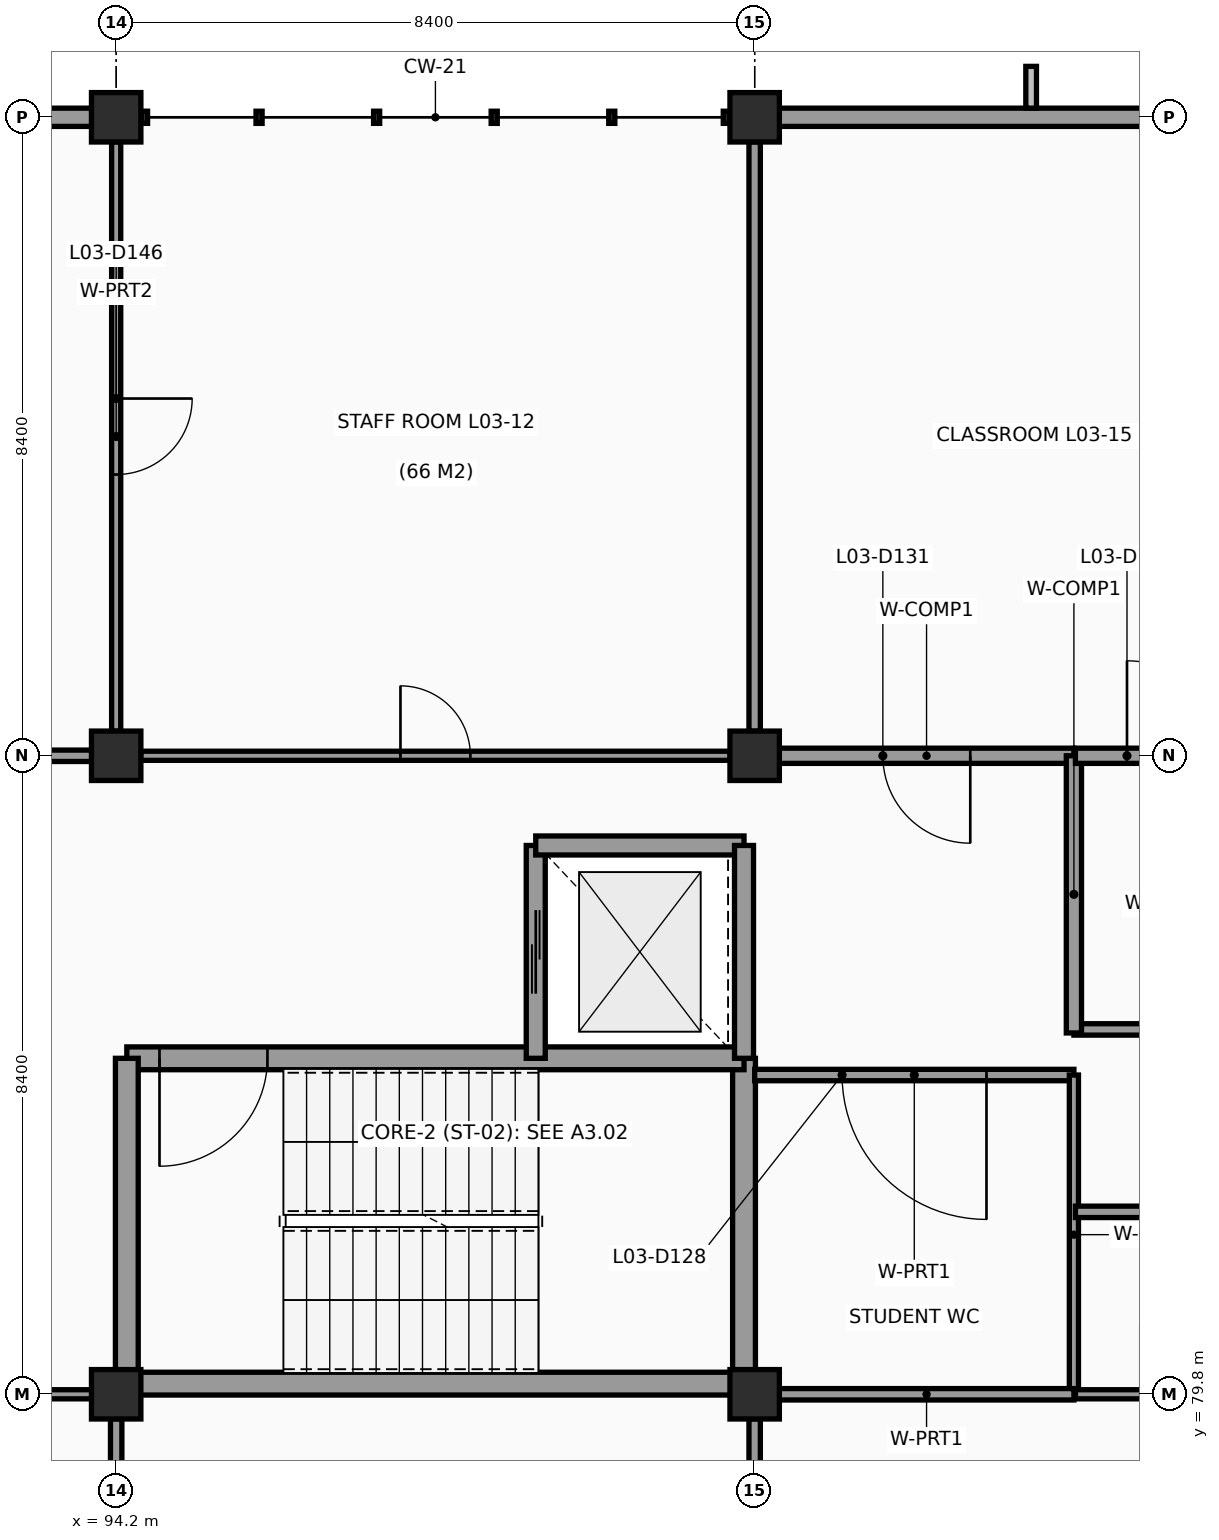
"""IFC4 building model, lengths in metres.
Left out: names, types, materials, properties, quantities, classifications, styles, units other than length and angle.
Written with IfcOpenShell. Run it as: python <this file> out.ifc"""

import sys

from ifc_helpers import new_model, si_unit, direction, frame, frame_2d, origin, origin_2d, place, context, subcontext, project, spatial, rectangle, extrude, element, fill, save


model = new_model("IFC4")
c1 = context("Model", 3, precision=1e-05, world=origin(), true_north=direction((0.0, 1.0)))
c2 = subcontext(c1, "Body", "Model", "MODEL_VIEW")
j1 = project(units=[si_unit("LENGTHUNIT", "METRE"), si_unit("PLANEANGLEUNIT", "RADIAN")], contexts=[c1])
p1 = place(None, origin())
s1 = spatial("IfcSite", under=j1, at=p1, CompositionType="ELEMENT")
p2 = place(p1, origin())
s2 = spatial("IfcBuilding", under=s1, at=p2, CompositionType="ELEMENT")
p3 = place(p2, frame((0.0, 0.0, 11.4)))
s3 = spatial("IfcBuildingStorey", under=s2, at=p3, CompositionType="ELEMENT", Elevation=11.4)
for number, where, z_axis, x_axis in (
    (1, (94.2, 79.8, 0.0), (0.0, 0.0, 1.0), (1.0, 0.0, 0.0)),
    (2, (94.2, 88.2, 0.0), (0.0, 0.0, 1.0), (1.0, 0.0, 0.0)),
    (3, (94.2, 96.6, 0.0), (0.0, 0.0, 1.0), (1.0, 0.0, 0.0)),
    (4, (102.6, 79.8, 0.0), (0.0, 0.0, 1.0), (1.0, 0.0, 0.0)),
    (5, (102.6, 88.2, 0.0), (0.0, 0.0, 1.0), (1.0, 0.0, 0.0)),
    (6, (102.6, 96.6, 0.0), (0.0, 0.0, 1.0), (1.0, 0.0, 0.0)),
):
    element("IfcColumn", number, at=place(p3, frame(where, z_axis=z_axis, x_axis=x_axis)), inside=s3, PredefinedType="COLUMN", context=c2, shape_type="SweptSolid", body=[
        extrude(rectangle(XDim=0.65, YDim=0.65, at=origin_2d()), origin(), (0.0, 0.0, 1.0), 3.6),
    ])
p4 = place(p3, frame((86.123, 96.6, 0.0), z_axis=(0.0, 0.0, 1.0), x_axis=(1.0, 0.0, 0.0)))
e7 = element("IfcWall", 7, at=p4, inside=s3, PredefinedType="SOLIDWALL", context=c2, shape_type="SweptSolid", body=[
    extrude(rectangle(XDim=7.754, YDim=0.24, at=frame_2d((3.877, 0.0))), origin(), (0.0, 0.0, 1.0), 2.64),
])
p5 = place(p3, frame((102.923, 96.6, 0.0), z_axis=(0.0, 0.0, 1.0), x_axis=(1.0, 0.0, 0.0)))
e8 = element("IfcWall", 8, at=p5, inside=s3, PredefinedType="SOLIDWALL", context=c2, shape_type="SweptSolid", body=[
    extrude(rectangle(XDim=6.629, YDim=0.24, at=frame_2d((3.314, 0.0))), origin(), (0.0, 0.0, 1.0), 2.64),
])
p6 = place(p3, frame((94.34, 79.94, 0.0), z_axis=(0.0, 0.0, 1.0), x_axis=(1.0, 0.0, 0.0)))
e9 = element("IfcWall", 9, at=p6, inside=s3, PredefinedType="SHEAR", context=c2, shape_type="SweptSolid", body=[
    extrude(rectangle(XDim=8.12, YDim=0.3, at=frame_2d((4.06, 0.0))), origin(), (0.0, 0.0, 1.0), 3.6),
])
p7 = place(p3, frame((102.46, 79.94, 0.0), z_axis=(0.0, 0.0, 1.0), x_axis=(0.0, 1.0, 0.0)))
e10 = element("IfcWall", 10, at=p7, inside=s3, PredefinedType="SHEAR", context=c2, shape_type="SweptSolid", body=[
    extrude(rectangle(XDim=4.28, YDim=0.3, at=frame_2d((2.14, 0.0))), origin(), (0.0, 0.0, 1.0), 3.6),
])
p8 = place(p3, frame((102.46, 84.22, 0.0), z_axis=(0.0, 0.0, 1.0), x_axis=(-1.0, 0.0, 0.0)))
e11 = element("IfcWall", 11, at=p8, inside=s3, PredefinedType="SHEAR", context=c2, shape_type="SweptSolid", body=[
    extrude(rectangle(XDim=8.12, YDim=0.3, at=frame_2d((4.06, 0.0))), origin(), (0.0, 0.0, 1.0), 3.6),
])
p9 = place(p8, frame((6.27, 0.0, 0.0)))
e12 = element("IfcOpeningElement", 12, at=p9, cuts=e11, PredefinedType="OPENING", context=c2, shape_type="SweptSolid", body=[
    extrude(rectangle(XDim=1.42, YDim=2.15, at=frame_2d((0.71, 1.075))), frame((0.0, 0.16, 0.0), z_axis=(0.0, -1.0, 0.0), x_axis=(1.0, 0.0, 0.0)), (0.0, 0.0, 1.0), 0.32),
])
p10 = place(p3, frame((94.34, 84.22, 0.0), z_axis=(0.0, 0.0, 1.0), x_axis=(0.0, -1.0, 0.0)))
e13 = element("IfcWall", 13, at=p10, inside=s3, PredefinedType="SHEAR", context=c2, shape_type="SweptSolid", body=[
    extrude(rectangle(XDim=4.28, YDim=0.3, at=frame_2d((2.14, 0.0))), origin(), (0.0, 0.0, 1.0), 3.6),
])
p11 = place(p3, frame((99.72, 87.02, 0.0), z_axis=(0.0, 0.0, 1.0), x_axis=(0.0, -1.0, 0.0)))
e14 = element("IfcWall", 14, at=p11, inside=s3, PredefinedType="SHEAR", context=c2, shape_type="SweptSolid", body=[
    extrude(rectangle(XDim=2.8, YDim=0.25, at=frame_2d((1.4, 0.0))), origin(), (0.0, 0.0, 1.0), 3.6),
])
p12 = place(p11, frame((0.85, 0.0, 0.0)))
e15 = element("IfcOpeningElement", 15, at=p12, cuts=e14, PredefinedType="OPENING", context=c2, shape_type="SweptSolid", body=[
    extrude(rectangle(XDim=1.1, YDim=2.15, at=frame_2d((0.55, 1.075))), frame((0.0, 0.135, 0.0), z_axis=(0.0, -1.0, 0.0), x_axis=(1.0, 0.0, 0.0)), (0.0, 0.0, 1.0), 0.27),
])
p13 = place(p3, frame((102.46, 87.02, 0.0), z_axis=(0.0, 0.0, 1.0), x_axis=(-1.0, 0.0, 0.0)))
e16 = element("IfcWall", 16, at=p13, inside=s3, PredefinedType="SHEAR", context=c2, shape_type="SweptSolid", body=[
    extrude(rectangle(XDim=2.74, YDim=0.25, at=frame_2d((1.37, 0.0))), origin(), (0.0, 0.0, 1.0), 3.6),
])
p14 = place(p3, frame((102.46, 84.22, 0.0), z_axis=(0.0, 0.0, 1.0), x_axis=(0.0, 1.0, 0.0)))
e17 = element("IfcWall", 17, at=p14, inside=s3, PredefinedType="SHEAR", context=c2, shape_type="SweptSolid", body=[
    extrude(rectangle(XDim=2.8, YDim=0.25, at=frame_2d((1.4, 0.0))), origin(), (0.0, 0.0, 1.0), 3.6),
])
p15 = place(p3, frame((102.6, 84.0, 0.0), z_axis=(0.0, 0.0, 1.0), x_axis=(1.0, 0.0, 0.0)))
e18 = element("IfcWall", 18, at=p15, inside=s3, PredefinedType="PARTITIONING", context=c2, shape_type="SweptSolid", body=[
    extrude(rectangle(XDim=4.2, YDim=0.15, at=frame_2d((2.1, 0.0))), origin(), (0.0, 0.0, 1.0), 2.94),
])
p16 = place(p15, frame((1.15, 0.0, 0.0)))
e19 = element("IfcOpeningElement", 19, at=p16, cuts=e18, PredefinedType="OPENING", context=c2, shape_type="SweptSolid", body=[
    extrude(rectangle(XDim=1.9, YDim=2.3, at=frame_2d((0.95, 1.15))), frame((0.0, 0.085, 0.0), z_axis=(0.0, -1.0, 0.0), x_axis=(1.0, 0.0, 0.0)), (0.0, 0.0, 1.0), 0.17),
])
p17 = place(p3, frame((106.8, 84.0, 0.0), z_axis=(0.0, 0.0, 1.0), x_axis=(0.0, -1.0, 0.0)))
e20 = element("IfcWall", 20, at=p17, inside=s3, PredefinedType="PARTITIONING", context=c2, shape_type="SweptSolid", body=[
    extrude(rectangle(XDim=4.2, YDim=0.12, at=frame_2d((2.1, 0.0))), origin(), (0.0, 0.0, 1.0), 2.59),
])
p18 = place(p3, frame((106.8, 79.8, 0.0), z_axis=(0.0, 0.0, 1.0), x_axis=(-1.0, 0.0, 0.0)))
e21 = element("IfcWall", 21, at=p18, inside=s3, PredefinedType="PARTITIONING", context=c2, shape_type="SweptSolid", body=[
    extrude(rectangle(XDim=3.877, YDim=0.15, at=frame_2d((1.938, 0.0))), origin(), (0.0, 0.0, 1.0), 2.59),
])
p19 = place(p3, frame((110.727, 79.8, 0.0), z_axis=(0.0, 0.0, 1.0), x_axis=(-1.0, 0.0, 0.0)))
e22 = element("IfcWall", 22, at=p19, inside=s3, PredefinedType="PARTITIONING", context=c2, shape_type="SweptSolid", body=[
    extrude(rectangle(XDim=3.907, YDim=0.12, at=frame_2d((1.954, 0.0))), origin(), (0.0, 0.0, 1.0), 2.59),
])
p20 = place(p19, frame((2.154, 0.0, 0.0)))
e23 = element("IfcOpeningElement", 23, at=p20, cuts=e22, PredefinedType="OPENING", context=c2, shape_type="SweptSolid", body=[
    extrude(rectangle(XDim=0.9, YDim=2.1, at=frame_2d((0.45, 1.05))), frame((0.0, 0.07, 0.0), z_axis=(0.0, -1.0, 0.0), x_axis=(1.0, 0.0, 0.0)), (0.0, 0.0, 1.0), 0.14),
])
p21 = place(p3, frame((106.82, 82.2, 0.0), z_axis=(0.0, 0.0, 1.0), x_axis=(1.0, 0.0, 0.0)))
e24 = element("IfcWall", 24, at=p21, inside=s3, PredefinedType="PARTITIONING", context=c2, shape_type="SweptSolid", body=[
    extrude(rectangle(XDim=4.18, YDim=0.15, at=frame_2d((2.09, 0.0))), origin(), (0.0, 0.0, 1.0), 2.98),
])
p22 = place(p3, frame((106.8, 84.6, 0.0), z_axis=(0.0, 0.0, 1.0), x_axis=(1.0, 0.0, 0.0)))
e25 = element("IfcWall", 25, at=p22, inside=s3, PredefinedType="PARTITIONING", context=c2, shape_type="SweptSolid", body=[
    extrude(rectangle(XDim=4.2, YDim=0.15, at=frame_2d((2.1, 0.0))), origin(), (0.0, 0.0, 1.0), 2.98),
])
p23 = place(p22, frame((1.65, 0.0, 0.0)))
e26 = element("IfcOpeningElement", 26, at=p23, cuts=e25, PredefinedType="OPENING", context=c2, shape_type="SweptSolid", body=[
    extrude(rectangle(XDim=0.9, YDim=2.05, at=frame_2d((0.45, 1.025))), frame((0.0, 0.085, 0.0), z_axis=(0.0, -1.0, 0.0), x_axis=(1.0, 0.0, 0.0)), (0.0, 0.0, 1.0), 0.17),
])
p24 = place(p3, frame((102.923, 88.2, 0.0), z_axis=(0.0, 0.0, 1.0), x_axis=(1.0, 0.0, 0.0)))
e27 = element("IfcWall", 27, at=p24, inside=s3, PredefinedType="PARTITIONING", context=c2, shape_type="SweptSolid", body=[
    extrude(rectangle(XDim=3.877, YDim=0.2, at=frame_2d((1.938, 0.0))), origin(), (0.0, 0.0, 1.0), 2.69),
])
p25 = place(p24, frame((1.364, 0.0, 0.0)))
e28 = element("IfcOpeningElement", 28, at=p25, cuts=e27, PredefinedType="OPENING", context=c2, shape_type="SweptSolid", body=[
    extrude(rectangle(XDim=1.15, YDim=2.15, at=frame_2d((0.575, 1.075))), frame((0.0, 0.11, 0.0), z_axis=(0.0, -1.0, 0.0), x_axis=(1.0, 0.0, 0.0)), (0.0, 0.0, 1.0), 0.22),
])
p26 = place(p3, frame((106.8, 88.2, 0.0), z_axis=(0.0, 0.0, 1.0), x_axis=(0.0, -1.0, 0.0)))
e29 = element("IfcWall", 29, at=p26, inside=s3, PredefinedType="PARTITIONING", context=c2, shape_type="SweptSolid", body=[
    extrude(rectangle(XDim=3.646, YDim=0.2, at=frame_2d((1.823, 0.0))), origin(), (0.0, 0.0, 1.0), 2.69),
])
p27 = place(p3, frame((106.82, 88.2, 0.0), z_axis=(0.0, 0.0, 1.0), x_axis=(1.0, 0.0, 0.0)))
e30 = element("IfcWall", 30, at=p27, inside=s3, PredefinedType="PARTITIONING", context=c2, shape_type="SweptSolid", body=[
    extrude(rectangle(XDim=3.907, YDim=0.2, at=frame_2d((1.954, 0.0))), origin(), (0.0, 0.0, 1.0), 2.69),
])
p28 = place(p27, frame((0.678, 0.0, 0.0)))
e31 = element("IfcOpeningElement", 31, at=p28, cuts=e30, PredefinedType="OPENING", context=c2, shape_type="SweptSolid", body=[
    extrude(rectangle(XDim=1.25, YDim=2.15, at=frame_2d((0.625, 1.075))), frame((0.0, 0.11, 0.0), z_axis=(0.0, -1.0, 0.0), x_axis=(1.0, 0.0, 0.0)), (0.0, 0.0, 1.0), 0.22),
])
p29 = place(p3, frame((86.123, 79.8, 0.0), z_axis=(0.0, 0.0, 1.0), x_axis=(1.0, 0.0, 0.0)))
e32 = element("IfcWall", 32, at=p29, inside=s3, PredefinedType="PARTITIONING", context=c2, shape_type="SweptSolid", body=[
    extrude(rectangle(XDim=7.754, YDim=0.12, at=frame_2d((3.877, 0.0))), origin(), (0.0, 0.0, 1.0), 2.59),
])
p30 = place(p3, frame((94.2, 79.477, 0.0), z_axis=(0.0, 0.0, 1.0), x_axis=(0.0, -1.0, 0.0)))
e33 = element("IfcWall", 33, at=p30, inside=s3, PredefinedType="PARTITIONING", context=c2, shape_type="SweptSolid", body=[
    extrude(rectangle(XDim=5.657, YDim=0.15, at=frame_2d((2.829, 0.0))), origin(), (0.0, 0.0, 1.0), 2.74),
])
p31 = place(p3, frame((86.123, 88.2, 0.0), z_axis=(0.0, 0.0, 1.0), x_axis=(1.0, 0.0, 0.0)))
e34 = element("IfcWall", 34, at=p31, inside=s3, PredefinedType="PARTITIONING", context=c2, shape_type="SweptSolid", body=[
    extrude(rectangle(XDim=7.754, YDim=0.15, at=frame_2d((3.877, 0.0))), origin(), (0.0, 0.0, 1.0), 2.69),
])
p32 = place(p31, frame((3.102, 0.0, 0.0)))
e35 = element("IfcOpeningElement", 35, at=p32, cuts=e34, PredefinedType="OPENING", context=c2, shape_type="SweptSolid", body=[
    extrude(rectangle(XDim=1.55, YDim=2.2, at=frame_2d((0.775, 1.1))), frame((0.0, 0.085, 0.0), z_axis=(0.0, -1.0, 0.0), x_axis=(1.0, 0.0, 0.0)), (0.0, 0.0, 1.0), 0.17),
])
p33 = place(p3, frame((94.2, 96.277, 0.0), z_axis=(0.0, 0.0, 1.0), x_axis=(0.0, -1.0, 0.0)))
e36 = element("IfcWall", 36, at=p33, inside=s3, PredefinedType="PARTITIONING", context=c2, shape_type="SweptSolid", body=[
    extrude(rectangle(XDim=7.754, YDim=0.12, at=frame_2d((3.877, 0.0))), origin(), (0.0, 0.0, 1.0), 2.74),
])
p34 = place(p33, frame((3.377, 0.0, 0.0)))
e37 = element("IfcOpeningElement", 37, at=p34, cuts=e36, PredefinedType="OPENING", context=c2, shape_type="SweptSolid", body=[
    extrude(rectangle(XDim=1.0, YDim=2.1, at=frame_2d((0.5, 1.05))), frame((0.0, 0.07, 0.0), z_axis=(0.0, -1.0, 0.0), x_axis=(1.0, 0.0, 0.0)), (0.0, 0.0, 1.0), 0.14),
])
p35 = place(p3, frame((102.6, 79.477, 0.0), z_axis=(0.0, 0.0, 1.0), x_axis=(0.0, -1.0, 0.0)))
e38 = element("IfcWall", 38, at=p35, inside=s3, PredefinedType="PARTITIONING", context=c2, shape_type="SweptSolid", body=[
    extrude(rectangle(XDim=5.657, YDim=0.15, at=frame_2d((2.829, 0.0))), origin(), (0.0, 0.0, 1.0), 2.94),
])
p36 = place(p3, frame((102.277, 88.2, 0.0), z_axis=(0.0, 0.0, 1.0), x_axis=(-1.0, 0.0, 0.0)))
e39 = element("IfcWall", 39, at=p36, inside=s3, PredefinedType="PARTITIONING", context=c2, shape_type="SweptSolid", body=[
    extrude(rectangle(XDim=7.754, YDim=0.12, at=frame_2d((3.877, 0.0))), origin(), (0.0, 0.0, 1.0), 2.69),
])
p37 = place(p36, frame((3.417, 0.0, 0.0)))
e40 = element("IfcOpeningElement", 40, at=p37, cuts=e39, PredefinedType="OPENING", context=c2, shape_type="SweptSolid", body=[
    extrude(rectangle(XDim=0.92, YDim=2.1, at=frame_2d((0.46, 1.05))), frame((0.0, 0.07, 0.0), z_axis=(0.0, -1.0, 0.0), x_axis=(1.0, 0.0, 0.0)), (0.0, 0.0, 1.0), 0.14),
])
p38 = place(p3, frame((102.6, 96.277, 0.0), z_axis=(0.0, 0.0, 1.0), x_axis=(0.0, -1.0, 0.0)))
e41 = element("IfcWall", 41, at=p38, inside=s3, PredefinedType="PARTITIONING", context=c2, shape_type="SweptSolid", body=[
    extrude(rectangle(XDim=7.754, YDim=0.15, at=frame_2d((3.877, 0.0))), origin(), (0.0, 0.0, 1.0), 2.94),
])
p39 = place(p9, frame((1.42, 0.0, 0.0), z_axis=(0.0, 0.0, 1.0), x_axis=(-1.0, 0.0, 0.0)))
e42 = element("IfcDoor", 42, at=p39, inside=s3, OperationType="SINGLE_SWING_RIGHT", PredefinedType="DOOR", context=c2, shape_type="SweptSolid", body=[
    extrude(rectangle(XDim=1.42, YDim=2.15, at=frame_2d((0.71, 1.075))), frame((0.0, 0.025, 0.0), z_axis=(0.0, -1.0, 0.0), x_axis=(1.0, 0.0, 0.0)), (0.0, 0.0, 1.0), 0.05),
])
fill(e12, e42)
p40 = place(p12, origin())
e43 = element("IfcDoor", 43, at=p40, inside=s3, OperationType="DOUBLE_DOOR_SLIDING", PredefinedType="DOOR", context=c2, shape_type="SweptSolid", body=[
    extrude(rectangle(XDim=1.1, YDim=2.15, at=frame_2d((0.55, 1.075))), frame((0.0, 0.025, 0.0), z_axis=(0.0, -1.0, 0.0), x_axis=(1.0, 0.0, 0.0)), (0.0, 0.0, 1.0), 0.05),
])
fill(e15, e43)
p41 = place(p16, origin())
e44 = element("IfcDoor", 44, at=p41, inside=s3, OperationType="DOUBLE_DOOR_SINGLE_SWING", PredefinedType="DOOR", context=c2, shape_type="SweptSolid", body=[
    extrude(rectangle(XDim=1.9, YDim=2.3, at=frame_2d((0.95, 1.15))), frame((0.0, 0.025, 0.0), z_axis=(0.0, -1.0, 0.0), x_axis=(1.0, 0.0, 0.0)), (0.0, 0.0, 1.0), 0.05),
])
fill(e19, e44)
p42 = place(p25, origin())
e45 = element("IfcDoor", 45, at=p42, inside=s3, OperationType="SINGLE_SWING_RIGHT", PredefinedType="DOOR", context=c2, shape_type="SweptSolid", body=[
    extrude(rectangle(XDim=1.15, YDim=2.15, at=frame_2d((0.575, 1.075))), frame((0.0, 0.025, 0.0), z_axis=(0.0, -1.0, 0.0), x_axis=(1.0, 0.0, 0.0)), (0.0, 0.0, 1.0), 0.05),
])
fill(e28, e45)
p43 = place(p28, origin())
e46 = element("IfcDoor", 46, at=p43, inside=s3, OperationType="SINGLE_SWING_LEFT", PredefinedType="DOOR", context=c2, shape_type="SweptSolid", body=[
    extrude(rectangle(XDim=1.25, YDim=2.15, at=frame_2d((0.625, 1.075))), frame((0.0, 0.025, 0.0), z_axis=(0.0, -1.0, 0.0), x_axis=(1.0, 0.0, 0.0)), (0.0, 0.0, 1.0), 0.05),
])
fill(e31, e46)
p44 = place(p34, origin())
e47 = element("IfcDoor", 47, at=p44, inside=s3, OperationType="SINGLE_SWING_LEFT", PredefinedType="DOOR", context=c2, shape_type="SweptSolid", body=[
    extrude(rectangle(XDim=1.0, YDim=2.1, at=frame_2d((0.5, 1.05))), frame((0.0, 0.025, 0.0), z_axis=(0.0, -1.0, 0.0), x_axis=(1.0, 0.0, 0.0)), (0.0, 0.0, 1.0), 0.05),
])
fill(e37, e47)
p45 = place(p37, origin())
e48 = element("IfcDoor", 48, at=p45, inside=s3, OperationType="SINGLE_SWING_RIGHT", PredefinedType="DOOR", context=c2, shape_type="SweptSolid", body=[
    extrude(rectangle(XDim=0.92, YDim=2.1, at=frame_2d((0.46, 1.05))), frame((0.0, 0.025, 0.0), z_axis=(0.0, -1.0, 0.0), x_axis=(1.0, 0.0, 0.0)), (0.0, 0.0, 1.0), 0.05),
])
fill(e40, e48)
save(model, sys.argv[1])
